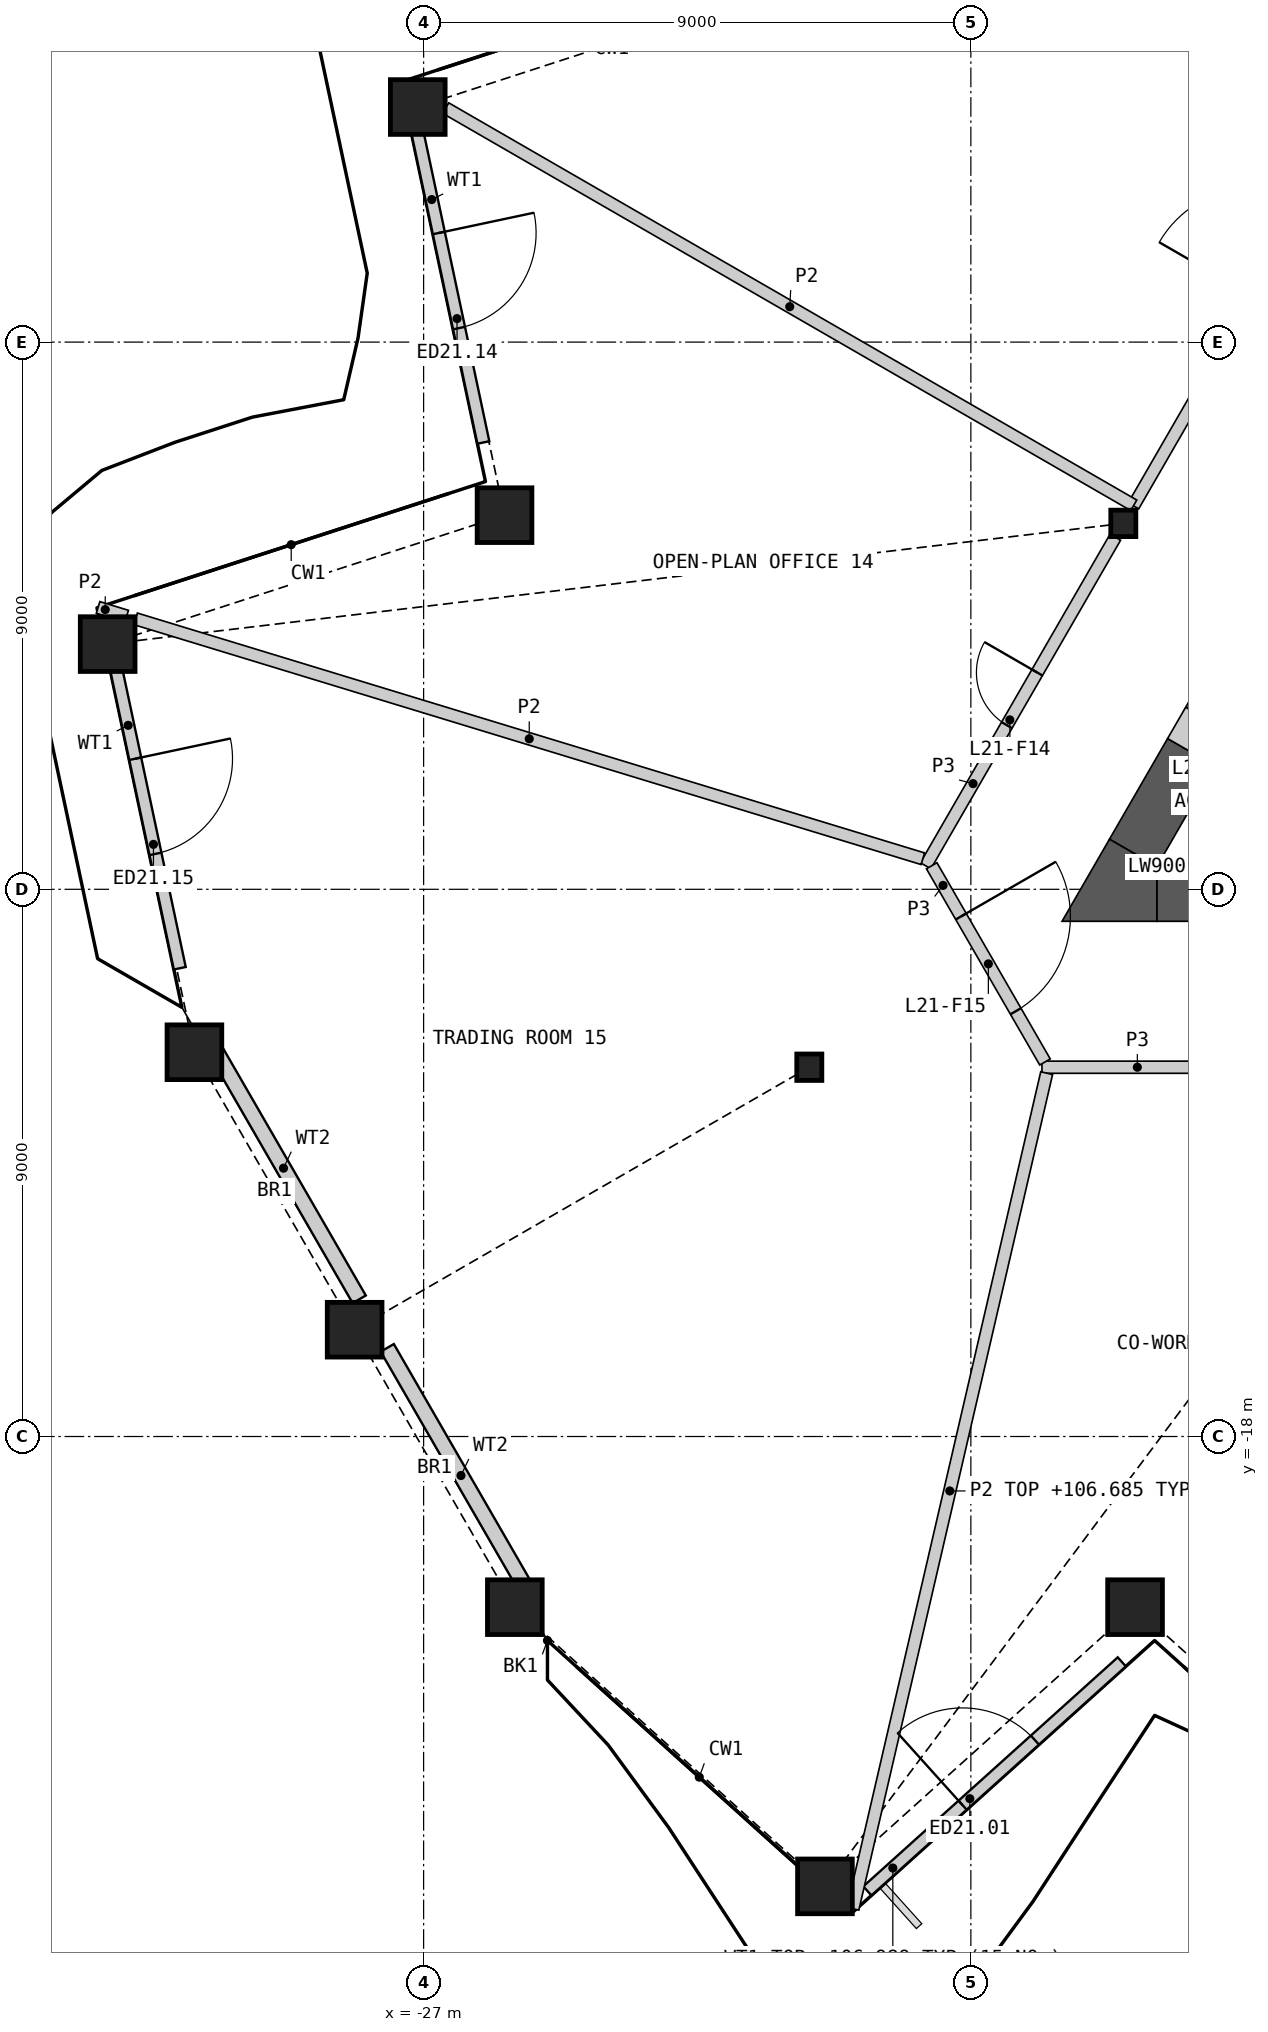
"""IFC4 building model, lengths in metres.
Left out: names, types, materials, properties, quantities, classifications, styles, units other than length and angle.
Written with IfcOpenShell. Run it as: python <this file> out.ifc"""

import sys

from ifc_helpers import new_model, si_unit, direction, frame, frame_2d, origin, origin_2d, place, context, subcontext, project, spatial, polyline, rectangle, hollow_rectangle, i_section, outline, extrude, element, fill, save


model = new_model("IFC4")
c1 = context("Model", 3, precision=1e-05, world=origin(), true_north=direction((0.0, 1.0)))
c2 = subcontext(c1, "Body", "Model", "MODEL_VIEW")
j1 = project(units=[si_unit("LENGTHUNIT", "METRE"), si_unit("PLANEANGLEUNIT", "RADIAN")], contexts=[c1])
p1 = place(None, origin())
s1 = spatial("IfcSite", under=j1, at=p1, CompositionType="ELEMENT")
p2 = place(p1, origin())
s2 = spatial("IfcBuilding", under=s1, at=p2, CompositionType="ELEMENT")
p3 = place(p2, frame((0.0, 0.0, 103.8)))
s3 = spatial("IfcBuildingStorey", under=s2, at=p3, CompositionType="ELEMENT", Elevation=103.8)
for number, where, z_axis, x_axis in (
    (1, (-25.5, -20.807, 0.0), (0.0, 0.0, 1.0), (1.0, 0.0, 0.0)),
    (2, (-20.4, -25.399, 0.0), (0.0, 0.0, 1.0), (1.0, 0.0, 0.0)),
    (3, (-15.3, -20.807, 0.0), (0.0, 0.0, 1.0), (1.0, 0.0, 0.0)),
    (4, (-27.096, 3.866, 0.0), (0.0, 0.0, 1.0), (1.0, 0.0, 0.0)),
    (5, (-25.669, -2.846, 0.0), (0.0, 0.0, 1.0), (1.0, 0.0, 0.0)),
    (6, (-32.196, -4.967, 0.0), (0.0, 0.0, 1.0), (1.0, 0.0, 0.0)),
    (7, (-30.769, -11.68, 0.0), (0.0, 0.0, 1.0), (1.0, 0.0, 0.0)),
    (8, (-28.135, -16.243, 0.0), (0.0, 0.0, 1.0), (1.0, 0.0, 0.0)),
):
    element("IfcColumn", number, at=place(p3, frame(where, z_axis=z_axis, x_axis=x_axis)), inside=s3, PredefinedType="COLUMN", context=c2, shape_type="SweptSolid", body=[
        extrude(hollow_rectangle(XDim=0.9, YDim=0.9, WallThickness=0.06, at=origin_2d()), origin(), (0.0, 0.0, 1.0), 4.2),
    ])
for number, where, z_axis, x_axis in (
    (9, (-15.493, -2.982, 0.0), (0.0, 0.0, 1.0), (1.0, 0.0, 0.0)),
    (10, (-20.657, -11.926, 0.0), (0.0, 0.0, 1.0), (1.0, 0.0, 0.0)),
):
    element("IfcColumn", number, at=place(p3, frame(where, z_axis=z_axis, x_axis=x_axis)), inside=s3, PredefinedType="COLUMN", context=c2, shape_type="SweptSolid", body=[
        extrude(i_section(OverallWidth=0.412, OverallDepth=0.435, WebThickness=0.036, FlangeThickness=0.057, at=origin_2d()), origin(), (0.0, 0.0, 1.0), 4.2),
    ])
p4 = place(p3, frame((-19.702, -25.474, 0.0), z_axis=(0.0, 0.0, 1.0), x_axis=(0.743145362679, 0.669130009736, 0.0)))
e11 = element("IfcWall", 11, at=p4, inside=s3, PredefinedType="SOLIDWALL", context=c2, shape_type="SweptSolid", body=[
    extrude(rectangle(XDim=5.631, YDim=0.2, at=frame_2d((2.815, 0.0))), origin(), (0.0, 0.0, 1.0), 3.189),
])
p5 = place(p4, frame((2.107, 0.0, 0.0)))
e12 = element("IfcOpeningElement", 12, at=p5, cuts=e11, PredefinedType="OPENING", context=c2, shape_type="SweptSolid", body=[
    extrude(rectangle(XDim=1.6, YDim=2.4, at=frame_2d((0.8, 1.2))), frame((0.0, 0.11, 0.0), z_axis=(0.0, -1.0, 0.0), x_axis=(1.0, 0.0, 0.0)), (0.0, 0.0, 1.0), 0.22),
])
p6 = place(p3, frame((-27.15, 3.676, 0.0), z_axis=(0.0, 0.0, 1.0), x_axis=(0.207912369528, -0.978147456469, 0.0)))
e13 = element("IfcWall", 13, at=p6, inside=s3, PredefinedType="SOLIDWALL", context=c2, shape_type="SweptSolid", body=[
    extrude(rectangle(XDim=5.446, YDim=0.2, at=frame_2d((2.723, 0.0))), origin(), (0.0, 0.0, 1.0), 3.189),
])
p7 = place(p6, frame((1.923, 0.0, 0.0)))
e14 = element("IfcOpeningElement", 14, at=p7, cuts=e13, PredefinedType="OPENING", context=c2, shape_type="SweptSolid", body=[
    extrude(rectangle(XDim=1.6, YDim=2.4, at=frame_2d((0.8, 1.2))), frame((0.0, 0.11, 0.0), z_axis=(0.0, -1.0, 0.0), x_axis=(1.0, 0.0, 0.0)), (0.0, 0.0, 1.0), 0.22),
])
p8 = place(p3, frame((-32.142, -4.971, 0.0), z_axis=(0.0, 0.0, 1.0), x_axis=(0.207903253291, -0.978149394148, 0.0)))
e15 = element("IfcWall", 15, at=p8, inside=s3, PredefinedType="SOLIDWALL", context=c2, shape_type="SweptSolid", body=[
    extrude(rectangle(XDim=5.446, YDim=0.2, at=frame_2d((2.723, 0.0))), origin(), (0.0, 0.0, 1.0), 3.189),
])
p9 = place(p8, frame((1.923, 0.0, 0.0)))
e16 = element("IfcOpeningElement", 16, at=p9, cuts=e15, PredefinedType="OPENING", context=c2, shape_type="SweptSolid", body=[
    extrude(rectangle(XDim=1.6, YDim=2.4, at=frame_2d((0.8, 1.2))), frame((0.0, 0.11, 0.0), z_axis=(0.0, -1.0, 0.0), x_axis=(1.0, 0.0, 0.0)), (0.0, 0.0, 1.0), 0.22),
])
p10 = place(p3, frame((-30.549, -11.43, 0.0), z_axis=(0.0, 0.0, 1.0), x_axis=(0.499992577793, -0.866029688955, 0.0)))
e17 = element("IfcWall", 17, at=p10, inside=s3, PredefinedType="SOLIDWALL", context=c2, shape_type="SweptSolid", body=[
    extrude(rectangle(XDim=4.981, YDim=0.25, at=frame_2d((2.49, 0.0))), origin(), (0.0, 0.0, 1.0), 3.189),
])
p11 = place(p3, frame((-27.598, -16.542, 0.0), z_axis=(0.0, 0.0, 1.0), x_axis=(0.499994084299, -0.866028819189, 0.0)))
e18 = element("IfcWall", 18, at=p11, inside=s3, PredefinedType="SOLIDWALL", context=c2, shape_type="SweptSolid", body=[
    extrude(rectangle(XDim=4.85, YDim=0.25, at=frame_2d((2.425, 0.0))), origin(), (0.0, 0.0, 1.0), 3.189),
])
p12 = place(p3, frame((-14.941, -9.076, 0.0), z_axis=(0.0, 0.0, 1.0), x_axis=(1.0, 0.0, 0.0)))
e19 = element("IfcWall", 19, at=p12, inside=s3, PredefinedType="SHEAR", context=c2, shape_type="SweptSolid", body=[
    extrude(rectangle(XDim=5.627, YDim=0.9, at=frame_2d((2.813, 0.0))), origin(), (0.0, 0.0, 1.0), 3.8),
])
p13 = place(p3, frame((-14.375, -6.745, 0.0), z_axis=(0.0, 0.0, 1.0), x_axis=(-0.499928740635, -0.866066541489, 0.0)))
e20 = element("IfcWall", 20, at=p13, inside=s3, PredefinedType="SHEAR", context=c2, shape_type="SweptSolid", body=[
    extrude(rectangle(XDim=1.912, YDim=0.9, at=frame_2d((0.956, 0.0))), origin(), (0.0, 0.0, 1.0), 3.8),
])
p14 = place(p3, origin())
e21 = element("IfcWall", 21, at=p14, inside=s3, PredefinedType="SHEAR", context=c2, shape_type="SweptSolid", body=[
    extrude(outline(polyline([(-14.941, -8.626), (-14.941, -9.526), (-16.5, -9.526), (-15.721, -8.176), (-14.941, -8.626)])), origin(), (0.0, 0.0, 1.0), 3.8),
])
p15 = place(p3, frame((-13.275, -4.84, 0.0), z_axis=(0.0, 0.0, 1.0), x_axis=(-0.50002983664, -0.866008176907, 0.0)))
e22 = element("IfcWall", 22, at=p15, inside=s3, PredefinedType="SHEAR", context=c2, shape_type="SweptSolid", body=[
    extrude(rectangle(XDim=2.2, YDim=0.9, at=frame_2d((1.1, 0.0))), origin(), (0.0, 0.0, 1.0), 3.8),
])
p16 = place(p15, frame((0.6, 0.0, 0.0)))
e23 = element("IfcOpeningElement", 23, at=p16, cuts=e22, PredefinedType="OPENING", context=c2, shape_type="SweptSolid", body=[
    extrude(rectangle(XDim=1.0, YDim=2.1, at=frame_2d((0.5, 1.05))), frame((0.0, 0.46, 0.0), z_axis=(0.0, -1.0, 0.0), x_axis=(1.0, 0.0, 0.0)), (0.0, 0.0, 1.0), 0.92),
])
p17 = place(p3, frame((-15.326, -2.693, 0.0), z_axis=(0.0, 0.0, 1.0), x_axis=(0.500010522431, 0.866019328571, 0.0)))
e24 = element("IfcWall", 24, at=p17, inside=s3, PredefinedType="PARTITIONING", context=c2, shape_type="SweptSolid", body=[
    extrude(rectangle(XDim=9.733, YDim=0.2, at=frame_2d((4.866, 0.0))), origin(), (0.0, 0.0, 1.0), 3.8),
])
p18 = place(p17, frame((3.966, 0.0, 0.0)))
e25 = element("IfcOpeningElement", 25, at=p18, cuts=e24, PredefinedType="OPENING", context=c2, shape_type="SweptSolid", body=[
    extrude(rectangle(XDim=1.8, YDim=2.1, at=frame_2d((0.9, 1.05))), frame((0.0, 0.11, 0.0), z_axis=(0.0, -1.0, 0.0), x_axis=(1.0, 0.0, 0.0)), (0.0, 0.0, 1.0), 0.22),
])
p19 = place(p3, frame((-16.831, -11.926, 0.0), z_axis=(0.0, 0.0, 1.0), x_axis=(1.0, 0.0, 0.0)))
e26 = element("IfcWall", 26, at=p19, inside=s3, PredefinedType="PARTITIONING", context=c2, shape_type="SweptSolid", body=[
    extrude(rectangle(XDim=6.275, YDim=0.2, at=frame_2d((3.137, 0.0))), origin(), (0.0, 0.0, 1.0), 3.8),
])
p20 = place(p19, frame((2.688, 0.0, 0.0)))
e27 = element("IfcOpeningElement", 27, at=p20, cuts=e26, PredefinedType="OPENING", context=c2, shape_type="SweptSolid", body=[
    extrude(rectangle(XDim=1.0, YDim=2.1, at=frame_2d((0.5, 1.05))), frame((0.0, 0.11, 0.0), z_axis=(0.0, -1.0, 0.0), x_axis=(1.0, 0.0, 0.0)), (0.0, 0.0, 1.0), 0.22),
])
p21 = place(p3, frame((-18.744, -8.613, 0.0), z_axis=(0.0, 0.0, 1.0), x_axis=(0.499997920671, 0.866026604282, 0.0)))
e28 = element("IfcWall", 28, at=p21, inside=s3, PredefinedType="PARTITIONING", context=c2, shape_type="SweptSolid", body=[
    extrude(rectangle(XDim=6.24, YDim=0.2, at=frame_2d((3.12, 0.0))), origin(), (0.0, 0.0, 1.0), 3.8),
])
p22 = place(p21, frame((2.67, 0.0, 0.0)))
e29 = element("IfcOpeningElement", 29, at=p22, cuts=e28, PredefinedType="OPENING", context=c2, shape_type="SweptSolid", body=[
    extrude(rectangle(XDim=1.0, YDim=2.1, at=frame_2d((0.5, 1.05))), frame((0.0, 0.11, 0.0), z_axis=(0.0, -1.0, 0.0), x_axis=(1.0, 0.0, 0.0)), (0.0, 0.0, 1.0), 0.22),
])
p23 = place(p3, frame((-18.644, -8.613, 0.0), z_axis=(0.0, 0.0, 1.0), x_axis=(0.499958791762, -0.866049194065, 0.0)))
e30 = element("IfcWall", 30, at=p23, inside=s3, PredefinedType="PARTITIONING", context=c2, shape_type="SweptSolid", body=[
    extrude(rectangle(XDim=3.726, YDim=0.2, at=frame_2d((1.863, 0.0))), origin(), (0.0, 0.0, 1.0), 3.8),
])
p24 = place(p23, frame((0.963, 0.0, 0.0)))
e31 = element("IfcOpeningElement", 31, at=p24, cuts=e30, PredefinedType="OPENING", context=c2, shape_type="SweptSolid", body=[
    extrude(rectangle(XDim=1.8, YDim=2.1, at=frame_2d((0.9, 1.05))), frame((0.0, 0.11, 0.0), z_axis=(0.0, -1.0, 0.0), x_axis=(1.0, 0.0, 0.0)), (0.0, 0.0, 1.0), 0.22),
])
p25 = place(p3, frame((-19.94, -25.767, 0.0), z_axis=(0.0, 0.0, 1.0), x_axis=(0.225854066841, 0.974161147086, 0.0)))
e32 = element("IfcWall", 32, at=p25, inside=s3, PredefinedType="PARTITIONING", context=c2, shape_type="SweptSolid", body=[
    extrude(rectangle(XDim=14.108, YDim=0.2, at=frame_2d((7.054, 0.0))), origin(), (0.0, 0.0, 1.0), 2.885),
])
p26 = place(p3, frame((-31.736, -4.552, 0.0), z_axis=(0.0, 0.0, 1.0), x_axis=(0.956574643239, -0.291487481569, 0.0)))
e33 = element("IfcWall", 33, at=p26, inside=s3, PredefinedType="PARTITIONING", context=c2, shape_type="SweptSolid", body=[
    extrude(rectangle(XDim=13.534, YDim=0.2, at=frame_2d((6.767, 0.0))), origin(), (0.0, 0.0, 1.0), 2.885),
])
p27 = place(p3, frame((-26.636, 3.848, 0.0), z_axis=(0.0, 0.0, 1.0), x_axis=(0.866029068465, -0.499993652534, 0.0)))
e34 = element("IfcWall", 34, at=p27, inside=s3, PredefinedType="PARTITIONING", context=c2, shape_type="SweptSolid", body=[
    extrude(rectangle(XDim=13.066, YDim=0.2, at=frame_2d((6.533, 0.0))), origin(), (0.0, 0.0, 1.0), 2.885),
])
p28 = place(p3, frame((-32.354, -4.364, 0.0), z_axis=(0.0, 0.0, 1.0), x_axis=(0.956697940105, -0.291082550832, 0.0)))
e35 = element("IfcWall", 35, at=p28, inside=s3, PredefinedType="PARTITIONING", context=c2, shape_type="SweptSolid", body=[
    extrude(rectangle(XDim=0.491, YDim=0.2, at=frame_2d((0.246, 0.0))), origin(), (0.0, 0.0, 1.0), 2.885),
])
p29 = place(p5, origin())
e36 = element("IfcDoor", 36, at=p29, inside=s3, OperationType="DOUBLE_DOOR_SINGLE_SWING", PredefinedType="DOOR", context=c2, shape_type="SweptSolid", body=[
    extrude(rectangle(XDim=1.6, YDim=2.4, at=frame_2d((0.8, 1.2))), frame((0.0, 0.025, 0.0), z_axis=(0.0, -1.0, 0.0), x_axis=(1.0, 0.0, 0.0)), (0.0, 0.0, 1.0), 0.05),
])
fill(e12, e36)
p30 = place(p7, origin())
e37 = element("IfcDoor", 37, at=p30, inside=s3, OperationType="DOUBLE_DOOR_SINGLE_SWING", PredefinedType="DOOR", context=c2, shape_type="SweptSolid", body=[
    extrude(rectangle(XDim=1.6, YDim=2.4, at=frame_2d((0.8, 1.2))), frame((0.0, 0.025, 0.0), z_axis=(0.0, -1.0, 0.0), x_axis=(1.0, 0.0, 0.0)), (0.0, 0.0, 1.0), 0.05),
])
fill(e14, e37)
p31 = place(p9, origin())
e38 = element("IfcDoor", 38, at=p31, inside=s3, OperationType="DOUBLE_DOOR_SINGLE_SWING", PredefinedType="DOOR", context=c2, shape_type="SweptSolid", body=[
    extrude(rectangle(XDim=1.6, YDim=2.4, at=frame_2d((0.8, 1.2))), frame((0.0, 0.025, 0.0), z_axis=(0.0, -1.0, 0.0), x_axis=(1.0, 0.0, 0.0)), (0.0, 0.0, 1.0), 0.05),
])
fill(e16, e38)
p32 = place(p22, origin())
e39 = element("IfcDoor", 39, at=p32, inside=s3, OperationType="SINGLE_SWING_RIGHT", PredefinedType="DOOR", context=c2, shape_type="SweptSolid", body=[
    extrude(rectangle(XDim=1.0, YDim=2.1, at=frame_2d((0.5, 1.05))), frame((0.0, 0.025, 0.0), z_axis=(0.0, -1.0, 0.0), x_axis=(1.0, 0.0, 0.0)), (0.0, 0.0, 1.0), 0.05),
])
fill(e29, e39)
p33 = place(p24, origin())
e40 = element("IfcDoor", 40, at=p33, inside=s3, OperationType="DOUBLE_DOOR_SINGLE_SWING", PredefinedType="DOOR", context=c2, shape_type="SweptSolid", body=[
    extrude(rectangle(XDim=1.8, YDim=2.1, at=frame_2d((0.9, 1.05))), frame((0.0, 0.025, 0.0), z_axis=(0.0, -1.0, 0.0), x_axis=(1.0, 0.0, 0.0)), (0.0, 0.0, 1.0), 0.05),
])
fill(e31, e40)
save(model, sys.argv[1])
